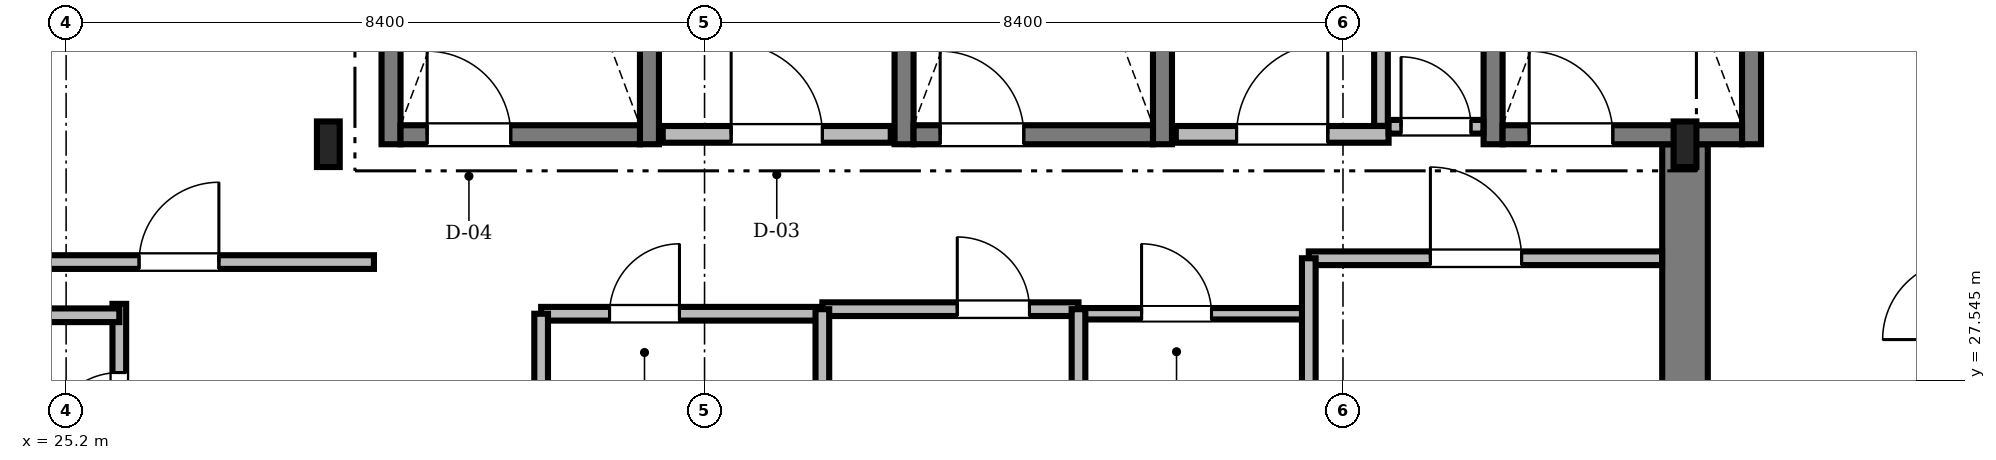
"""IFC4 building model, lengths in metres.
Left out: names, types, materials, properties, quantities, classifications, styles, units other than length and angle.
Written with IfcOpenShell. Run it as: python <this file> out.ifc"""

import sys

from ifc_helpers import new_model, si_unit, direction, frame, frame_2d, origin, origin_2d, place, context, subcontext, project, spatial, rectangle, i_section, extrude, source, transform, mapped, element, fill, save


model = new_model("IFC4")
c1 = context("Model", 3, precision=1e-05, world=origin(), true_north=direction((0.0, 1.0)))
c2 = subcontext(c1, "Body", "Model", "MODEL_VIEW")
j1 = project(units=[si_unit("LENGTHUNIT", "METRE"), si_unit("PLANEANGLEUNIT", "RADIAN")], contexts=[c1])
p1 = place(None, origin())
s1 = spatial("IfcSite", under=j1, at=p1, CompositionType="ELEMENT")
p2 = place(p1, origin())
s2 = spatial("IfcBuilding", under=s1, at=p2, CompositionType="ELEMENT")
p3 = place(p2, frame((0.0, 0.0, 278.25)))
s3 = spatial("IfcBuildingStorey", under=s2, at=p3, CompositionType="ELEMENT", Elevation=278.25)
m1 = source(origin(), c2, "Body", "SweptSolid", [
    extrude(rectangle(XDim=13.15, YDim=0.6, at=frame_2d((6.575, 0.0))), origin(), (0.0, 0.0, 1.0), 3.3),
])
p4 = place(p3, frame((46.5, 17.5, 0.0), z_axis=(0.0, 0.0, 1.0), x_axis=(0.0, 1.0, 0.0)))
e1 = element("IfcWall", 1, at=p4, inside=s3, PredefinedType="SHEAR", context=c2, shape_type="MappedRepresentation", body=[
    mapped(m1, transform((0.0, 0.0, 0.0), scale=1.0)),
])
m2 = source(origin(), c2, "Body", "SweptSolid", [
    extrude(i_section(OverallWidth=0.3, OverallDepth=0.6, WebThickness=0.015, FlangeThickness=0.03, FilletRadius=0.027, at=origin_2d()), origin(), (0.0, 0.0, 1.0), 3.3),
])
for number, where, z_axis, x_axis in (
    (2, (28.65, 30.65, 0.0), (0.0, 0.0, 1.0), (1.0, 0.0, 0.0)),
    (3, (46.5, 30.65, 0.0), (0.0, 0.0, 1.0), (1.0, 0.0, 0.0)),
):
    element("IfcColumn", number, at=place(p3, frame(where, z_axis=z_axis, x_axis=x_axis)), inside=s3, PredefinedType="COLUMN", context=c2, shape_type="MappedRepresentation", body=[
        mapped(m2, transform((0.0, 0.0, 0.0), scale=1.0)),
    ])
m3 = source(origin(), c2, "Body", "SweptSolid", [
    extrude(rectangle(XDim=9.35, YDim=0.25, at=frame_2d((4.675, 0.0))), origin(), (0.0, 0.0, 1.0), 3.75),
])
for number, where, z_axis, x_axis in (
    (4, (29.475, 30.65, 0.0), (0.0, 0.0, 1.0), (0.0, 1.0, 0.0)),
    (5, (32.875, 30.65, 0.0), (0.0, 0.0, 1.0), (0.0, 1.0, 0.0)),
):
    element("IfcWall", number, at=place(p3, frame(where, z_axis=z_axis, x_axis=x_axis)), inside=s3, PredefinedType="SOLIDWALL", context=c2, shape_type="MappedRepresentation", body=[
        mapped(m3, transform((0.0, 0.0, 0.0), scale=1.0)),
    ])
m4 = source(origin(), c2, "Body", "SweptSolid", [
    extrude(rectangle(XDim=3.15, YDim=0.25, at=frame_2d((1.575, 0.0))), origin(), (0.0, 0.0, 1.0), 3.75),
])
p5 = place(p3, frame((29.6, 30.775, 0.0), z_axis=(0.0, 0.0, 1.0), x_axis=(1.0, 0.0, 0.0)))
e6 = element("IfcWall", 6, at=p5, inside=s3, PredefinedType="SOLIDWALL", context=c2, shape_type="MappedRepresentation", body=[
    mapped(m4, transform((0.0, 0.0, 0.0), scale=1.0)),
])
m5 = source(origin(), c2, "Body", "SweptSolid", [
    extrude(rectangle(XDim=1.1, YDim=2.2, at=frame_2d((0.55, 1.1))), frame((0.0, 0.135, 0.0), z_axis=(0.0, -1.0, 0.0), x_axis=(1.0, 0.0, 0.0)), (0.0, 0.0, 1.0), 0.27),
])
p6 = place(p5, frame((0.35, 0.0, 0.0)))
e7 = element("IfcOpeningElement", 7, at=p6, cuts=e6, PredefinedType="OPENING", context=c2, shape_type="MappedRepresentation", body=[
    mapped(m5, transform((0.0, 0.0, 0.0), scale=1.0)),
])
for number, where, z_axis, x_axis in (
    (8, (36.225, 30.65, 0.0), (0.0, 0.0, 1.0), (0.0, 1.0, 0.0)),
    (9, (39.625, 30.65, 0.0), (0.0, 0.0, 1.0), (0.0, 1.0, 0.0)),
):
    element("IfcWall", number, at=place(p3, frame(where, z_axis=z_axis, x_axis=x_axis)), inside=s3, PredefinedType="SOLIDWALL", context=c2, shape_type="MappedRepresentation", body=[
        mapped(m3, transform((0.0, 0.0, 0.0), scale=1.0)),
    ])
p7 = place(p3, frame((36.35, 30.775, 0.0), z_axis=(0.0, 0.0, 1.0), x_axis=(1.0, 0.0, 0.0)))
e10 = element("IfcWall", 10, at=p7, inside=s3, PredefinedType="SOLIDWALL", context=c2, shape_type="MappedRepresentation", body=[
    mapped(m4, transform((0.0, 0.0, 0.0), scale=1.0)),
])
p8 = place(p7, frame((0.35, 0.0, 0.0)))
e11 = element("IfcOpeningElement", 11, at=p8, cuts=e10, PredefinedType="OPENING", context=c2, shape_type="MappedRepresentation", body=[
    mapped(m5, transform((0.0, 0.0, 0.0), scale=1.0)),
])
for number, where, z_axis, x_axis in (
    (12, (43.975, 30.65, 0.0), (0.0, 0.0, 1.0), (0.0, 1.0, 0.0)),
    (13, (47.375, 30.65, 0.0), (0.0, 0.0, 1.0), (0.0, 1.0, 0.0)),
):
    element("IfcWall", number, at=place(p3, frame(where, z_axis=z_axis, x_axis=x_axis)), inside=s3, PredefinedType="SOLIDWALL", context=c2, shape_type="MappedRepresentation", body=[
        mapped(m3, transform((0.0, 0.0, 0.0), scale=1.0)),
    ])
p9 = place(p3, frame((44.1, 30.775, 0.0), z_axis=(0.0, 0.0, 1.0), x_axis=(1.0, 0.0, 0.0)))
e14 = element("IfcWall", 14, at=p9, inside=s3, PredefinedType="SOLIDWALL", context=c2, shape_type="MappedRepresentation", body=[
    mapped(m4, transform((0.0, 0.0, 0.0), scale=1.0)),
])
p10 = place(p9, frame((0.35, 0.0, 0.0)))
e15 = element("IfcOpeningElement", 15, at=p10, cuts=e14, PredefinedType="OPENING", context=c2, shape_type="MappedRepresentation", body=[
    mapped(m5, transform((0.0, 0.0, 0.0), scale=1.0)),
])
m6 = source(origin(), c2, "Body", "SweptSolid", [
    extrude(rectangle(XDim=3.0, YDim=0.22, at=frame_2d((1.5, 0.0))), origin(), (0.0, 0.0, 1.0), 3.3),
])
p11 = place(p3, frame((33.05, 30.78, 0.0), z_axis=(0.0, 0.0, 1.0), x_axis=(1.0, 0.0, 0.0)))
e16 = element("IfcWall", 16, at=p11, inside=s3, PredefinedType="SOLIDWALL", context=c2, shape_type="MappedRepresentation", body=[
    mapped(m6, transform((0.0, 0.0, 0.0), scale=1.0)),
])
m7 = source(origin(), c2, "Body", "SweptSolid", [
    extrude(rectangle(XDim=1.2, YDim=2.2, at=frame_2d((0.6, 1.1))), frame((0.0, 0.12, 0.0), z_axis=(0.0, -1.0, 0.0), x_axis=(1.0, 0.0, 0.0)), (0.0, 0.0, 1.0), 0.24),
])
p12 = place(p11, frame((0.9, 0.0, 0.0)))
e17 = element("IfcOpeningElement", 17, at=p12, cuts=e16, PredefinedType="OPENING", context=c2, shape_type="MappedRepresentation", body=[
    mapped(m7, transform((0.0, 0.0, 0.0), scale=1.0)),
])
m8 = source(origin(), c2, "Body", "SweptSolid", [
    extrude(rectangle(XDim=2.8, YDim=0.22, at=frame_2d((1.4, 0.0))), origin(), (0.0, 0.0, 1.0), 3.3),
])
p13 = place(p3, frame((39.8, 30.78, 0.0), z_axis=(0.0, 0.0, 1.0), x_axis=(1.0, 0.0, 0.0)))
e18 = element("IfcWall", 18, at=p13, inside=s3, PredefinedType="SOLIDWALL", context=c2, shape_type="MappedRepresentation", body=[
    mapped(m8, transform((0.0, 0.0, 0.0), scale=1.0)),
])
p14 = place(p13, frame((0.8, 0.0, 0.0)))
e19 = element("IfcOpeningElement", 19, at=p14, cuts=e18, PredefinedType="OPENING", context=c2, shape_type="MappedRepresentation", body=[
    mapped(m7, transform((0.0, 0.0, 0.0), scale=1.0)),
])
m9 = source(origin(), c2, "Body", "SweptSolid", [
    extrude(rectangle(XDim=14.6, YDim=0.18, at=frame_2d((7.3, 0.0))), origin(), (0.0, 0.0, 1.0), 2.742),
])
p15 = place(p3, frame((25.9, 13.95, 0.0), z_axis=(0.0, 0.0, 1.0), x_axis=(0.0, 1.0, 0.0)))
e20 = element("IfcWall", 20, at=p15, inside=s3, PredefinedType="PARTITIONING", context=c2, shape_type="MappedRepresentation", body=[
    mapped(m9, transform((0.0, 0.0, 0.0), scale=1.0)),
])
m10 = source(origin(), c2, "Body", "SweptSolid", [
    extrude(rectangle(XDim=1.05, YDim=2.2, at=frame_2d((0.525, 1.1))), frame((0.0, 0.1, 0.0), z_axis=(0.0, -1.0, 0.0), x_axis=(1.0, 0.0, 0.0)), (0.0, 0.0, 1.0), 0.2),
])
p16 = place(p15, frame((1.981, 0.0, 0.0)))
e21 = element("IfcOpeningElement", 21, at=p16, cuts=e20, PredefinedType="OPENING", context=c2, shape_type="MappedRepresentation", body=[
    mapped(m10, transform((0.0, 0.0, 0.0), scale=1.0)),
])
m11 = source(origin(), c2, "Body", "SweptSolid", [
    extrude(rectangle(XDim=0.95, YDim=2.15, at=frame_2d((0.475, 1.075))), frame((0.0, 0.1, 0.0), z_axis=(0.0, -1.0, 0.0), x_axis=(1.0, 0.0, 0.0)), (0.0, 0.0, 1.0), 0.2),
])
p17 = place(p15, frame((7.93, 0.0, 0.0)))
e22 = element("IfcOpeningElement", 22, at=p17, cuts=e20, PredefinedType="OPENING", context=c2, shape_type="MappedRepresentation", body=[
    mapped(m11, transform((0.0, 0.0, 0.0), scale=1.0)),
])
p18 = place(p15, frame((12.747, 0.0, 0.0)))
e23 = element("IfcOpeningElement", 23, at=p18, cuts=e20, PredefinedType="OPENING", context=c2, shape_type="MappedRepresentation", body=[
    mapped(m11, transform((0.0, 0.0, 0.0), scale=1.0)),
])
m12 = source(origin(), c2, "Body", "SweptSolid", [
    extrude(rectangle(XDim=10.088, YDim=0.18, at=frame_2d((5.044, 0.0))), origin(), (0.0, 0.0, 1.0), 2.08),
])
p19 = place(p3, frame((19.162, 29.1, 0.0), z_axis=(0.0, 0.0, 1.0), x_axis=(1.0, 0.0, 0.0)))
e24 = element("IfcWall", 24, at=p19, inside=s3, PredefinedType="PARTITIONING", context=c2, shape_type="MappedRepresentation", body=[
    mapped(m12, transform((0.0, 0.0, 0.0), scale=1.0)),
])
p20 = place(p19, frame((6.998, 0.0, 0.0)))
e25 = element("IfcOpeningElement", 25, at=p20, cuts=e24, PredefinedType="OPENING", context=c2, shape_type="MappedRepresentation", body=[
    mapped(m10, transform((0.0, 0.0, 0.0), scale=1.0)),
])
m13 = source(origin(), c2, "Body", "SweptSolid", [
    extrude(rectangle(XDim=4.648, YDim=0.18, at=frame_2d((2.324, 0.0))), origin(), (0.0, 0.0, 1.0), 2.932),
])
p21 = place(p3, frame((41.55, 29.15, 0.0), z_axis=(0.0, 0.0, 1.0), x_axis=(1.0, 0.0, 0.0)))
e26 = element("IfcWall", 26, at=p21, inside=s3, PredefinedType="PARTITIONING", context=c2, shape_type="MappedRepresentation", body=[
    mapped(m13, transform((0.0, 0.0, 0.0), scale=1.0)),
])
m14 = source(origin(), c2, "Body", "SweptSolid", [
    extrude(rectangle(XDim=1.2, YDim=2.2, at=frame_2d((0.6, 1.1))), frame((0.0, 0.1, 0.0), z_axis=(0.0, -1.0, 0.0), x_axis=(1.0, 0.0, 0.0)), (0.0, 0.0, 1.0), 0.2),
])
p22 = place(p21, frame((1.6, 0.0, 0.0)))
e27 = element("IfcOpeningElement", 27, at=p22, cuts=e26, PredefinedType="OPENING", context=c2, shape_type="MappedRepresentation", body=[
    mapped(m14, transform((0.0, 0.0, 0.0), scale=1.0)),
])
m15 = source(origin(), c2, "Body", "SweptSolid", [
    extrude(rectangle(XDim=3.7, YDim=0.18, at=frame_2d((1.85, 0.0))), origin(), (0.0, 0.0, 1.0), 2.932),
])
p23 = place(p3, frame((31.45, 28.42, 0.0), z_axis=(0.0, 0.0, 1.0), x_axis=(1.0, 0.0, 0.0)))
e28 = element("IfcWall", 28, at=p23, inside=s3, PredefinedType="PARTITIONING", context=c2, shape_type="MappedRepresentation", body=[
    mapped(m15, transform((0.0, 0.0, 0.0), scale=1.0)),
])
m16 = source(origin(), c2, "Body", "SweptSolid", [
    extrude(rectangle(XDim=0.92, YDim=2.1, at=frame_2d((0.46, 1.05))), frame((0.0, 0.1, 0.0), z_axis=(0.0, -1.0, 0.0), x_axis=(1.0, 0.0, 0.0)), (0.0, 0.0, 1.0), 0.2),
])
p24 = place(p23, frame((0.9, 0.0, 0.0)))
e29 = element("IfcOpeningElement", 29, at=p24, cuts=e28, PredefinedType="OPENING", context=c2, shape_type="MappedRepresentation", body=[
    mapped(m16, transform((0.0, 0.0, 0.0), scale=1.0)),
])
m17 = source(origin(), c2, "Body", "SweptSolid", [
    extrude(rectangle(XDim=3.37, YDim=0.18, at=frame_2d((1.685, 0.0))), origin(), (0.0, 0.0, 1.0), 3.3),
])
p25 = place(p3, frame((35.15, 28.48, 0.0), z_axis=(0.0, 0.0, 1.0), x_axis=(1.0, 0.0, 0.0)))
e30 = element("IfcWall", 30, at=p25, inside=s3, PredefinedType="PARTITIONING", context=c2, shape_type="MappedRepresentation", body=[
    mapped(m17, transform((0.0, 0.0, 0.0), scale=1.0)),
])
p26 = place(p25, frame((1.775, 0.0, 0.0)))
e31 = element("IfcOpeningElement", 31, at=p26, cuts=e30, PredefinedType="OPENING", context=c2, shape_type="MappedRepresentation", body=[
    mapped(m11, transform((0.0, 0.0, 0.0), scale=1.0)),
])
m18 = source(origin(), c2, "Body", "SweptSolid", [
    extrude(rectangle(XDim=3.0, YDim=0.15, at=frame_2d((1.5, 0.0))), origin(), (0.0, 0.0, 1.0), 3.3),
])
p27 = place(p3, frame((38.52, 28.42, 0.0), z_axis=(0.0, 0.0, 1.0), x_axis=(1.0, 0.0, 0.0)))
e32 = element("IfcWall", 32, at=p27, inside=s3, PredefinedType="PARTITIONING", context=c2, shape_type="MappedRepresentation", body=[
    mapped(m18, transform((0.0, 0.0, 0.0), scale=1.0)),
])
m19 = source(origin(), c2, "Body", "SweptSolid", [
    extrude(rectangle(XDim=0.92, YDim=2.1, at=frame_2d((0.46, 1.05))), frame((0.0, 0.085, 0.0), z_axis=(0.0, -1.0, 0.0), x_axis=(1.0, 0.0, 0.0)), (0.0, 0.0, 1.0), 0.17),
])
p28 = place(p27, frame((0.83, 0.0, 0.0)))
e33 = element("IfcOpeningElement", 33, at=p28, cuts=e32, PredefinedType="OPENING", context=c2, shape_type="MappedRepresentation", body=[
    mapped(m19, transform((0.0, 0.0, 0.0), scale=1.0)),
])
m20 = source(origin(), c2, "Body", "SweptSolid", [
    extrude(rectangle(XDim=1.248, YDim=0.18, at=frame_2d((0.624, 0.0))), origin(), (0.0, 0.0, 1.0), 3.3),
])
p29 = place(p3, frame((42.6, 30.88, 0.0), z_axis=(0.0, 0.0, 1.0), x_axis=(1.0, 0.0, 0.0)))
e34 = element("IfcWall", 34, at=p29, inside=s3, PredefinedType="PARTITIONING", context=c2, shape_type="MappedRepresentation", body=[
    mapped(m20, transform((0.0, 0.0, 0.0), scale=1.0)),
])
p30 = place(p29, frame((0.164, 0.0, 0.0)))
e35 = element("IfcOpeningElement", 35, at=p30, cuts=e34, PredefinedType="OPENING", context=c2, shape_type="MappedRepresentation", body=[
    mapped(m16, transform((0.0, 0.0, 0.0), scale=1.0)),
])
m21 = source(origin(), c2, "Body", "SweptSolid", [
    extrude(rectangle(XDim=6.93, YDim=0.18, at=frame_2d((3.465, 0.0))), origin(), (0.0, 0.0, 1.0), 2.08),
])
p31 = place(p3, frame((18.97, 28.4, 0.0), z_axis=(0.0, 0.0, 1.0), x_axis=(1.0, 0.0, 0.0)))
e36 = element("IfcWall", 36, at=p31, inside=s3, PredefinedType="PARTITIONING", context=c2, shape_type="MappedRepresentation", body=[
    mapped(m21, transform((0.0, 0.0, 0.0), scale=1.0)),
])
m22 = source(origin(), c2, "Body", "SweptSolid", [
    extrude(rectangle(XDim=2.35, YDim=0.18, at=frame_2d((1.175, 0.0))), origin(), (0.0, 0.0, 1.0), 2.932),
])
p32 = place(p3, frame((41.55, 26.8, 0.0), z_axis=(0.0, 0.0, 1.0), x_axis=(0.0, 1.0, 0.0)))
e37 = element("IfcWall", 37, at=p32, inside=s3, PredefinedType="PARTITIONING", context=c2, shape_type="MappedRepresentation", body=[
    mapped(m22, transform((0.0, 0.0, 0.0), scale=1.0)),
])
m23 = source(origin(), c2, "Body", "SweptSolid", [
    extrude(rectangle(XDim=1.858, YDim=0.18, at=frame_2d((0.929, 0.0))), origin(), (0.0, 0.0, 1.0), 3.3),
])
p33 = place(p3, frame((42.5, 30.892, 0.0), z_axis=(0.0, 0.0, 1.0), x_axis=(0.0, 1.0, 0.0)))
e38 = element("IfcWall", 38, at=p33, inside=s3, PredefinedType="PARTITIONING", context=c2, shape_type="MappedRepresentation", body=[
    mapped(m23, transform((0.0, 0.0, 0.0), scale=1.0)),
])
m24 = source(origin(), c2, "Body", "SweptSolid", [
    extrude(rectangle(XDim=1.66, YDim=0.18, at=frame_2d((0.83, 0.0))), origin(), (0.0, 0.0, 1.0), 2.842),
])
for number, where, z_axis, x_axis in (
    (39, (35.15, 26.82, 0.0), (0.0, 0.0, 1.0), (0.0, 1.0, 0.0)),
    (40, (38.52, 26.82, 0.0), (0.0, 0.0, 1.0), (0.0, 1.0, 0.0)),
):
    element("IfcWall", number, at=place(p3, frame(where, z_axis=z_axis, x_axis=x_axis)), inside=s3, PredefinedType="PARTITIONING", context=c2, shape_type="MappedRepresentation", body=[
        mapped(m24, transform((0.0, 0.0, 0.0), scale=1.0)),
    ])
m25 = source(origin(), c2, "Body", "SweptSolid", [
    extrude(rectangle(XDim=1.6, YDim=0.18, at=frame_2d((0.8, 0.0))), origin(), (0.0, 0.0, 1.0), 2.842),
])
p34 = place(p3, frame((31.45, 26.82, 0.0), z_axis=(0.0, 0.0, 1.0), x_axis=(0.0, 1.0, 0.0)))
e41 = element("IfcWall", 41, at=p34, inside=s3, PredefinedType="PARTITIONING", context=c2, shape_type="MappedRepresentation", body=[
    mapped(m25, transform((0.0, 0.0, 0.0), scale=1.0)),
])
m26 = source(origin(), c2, "Body", "SweptSolid", [
    extrude(rectangle(XDim=1.1, YDim=2.2, at=frame_2d((0.55, 1.1))), frame((0.0, 0.025, 0.0), z_axis=(0.0, -1.0, 0.0), x_axis=(1.0, 0.0, 0.0)), (0.0, 0.0, 1.0), 0.05),
])
p35 = place(p6, origin())
e42 = element("IfcDoor", 42, at=p35, inside=s3, OperationType="SINGLE_SWING_LEFT", PredefinedType="DOOR", context=c2, shape_type="MappedRepresentation", body=[
    mapped(m26, transform((0.0, 0.0, 0.0), scale=1.0)),
])
fill(e7, e42)
p36 = place(p8, origin())
e43 = element("IfcDoor", 43, at=p36, inside=s3, OperationType="SINGLE_SWING_LEFT", PredefinedType="DOOR", context=c2, shape_type="MappedRepresentation", body=[
    mapped(m26, transform((0.0, 0.0, 0.0), scale=1.0)),
])
fill(e11, e43)
p37 = place(p10, origin())
e44 = element("IfcDoor", 44, at=p37, inside=s3, OperationType="SINGLE_SWING_LEFT", PredefinedType="DOOR", context=c2, shape_type="MappedRepresentation", body=[
    mapped(m26, transform((0.0, 0.0, 0.0), scale=1.0)),
])
fill(e15, e44)
m27 = source(origin(), c2, "Body", "SweptSolid", [
    extrude(rectangle(XDim=1.2, YDim=2.2, at=frame_2d((0.6, 1.1))), frame((0.0, 0.025, 0.0), z_axis=(0.0, -1.0, 0.0), x_axis=(1.0, 0.0, 0.0)), (0.0, 0.0, 1.0), 0.05),
])
p38 = place(p12, origin())
e45 = element("IfcDoor", 45, at=p38, inside=s3, OperationType="SINGLE_SWING_LEFT", PredefinedType="DOOR", context=c2, shape_type="MappedRepresentation", body=[
    mapped(m27, transform((0.0, 0.0, 0.0), scale=1.0)),
])
fill(e17, e45)
p39 = place(p14, origin())
e46 = element("IfcDoor", 46, at=p39, inside=s3, OperationType="SINGLE_SWING_RIGHT", PredefinedType="DOOR", context=c2, shape_type="MappedRepresentation", body=[
    mapped(m27, transform((0.0, 0.0, 0.0), scale=1.0)),
])
fill(e19, e46)
m28 = source(origin(), c2, "Body", "SweptSolid", [
    extrude(rectangle(XDim=0.95, YDim=2.15, at=frame_2d((0.475, 1.075))), frame((0.0, 0.025, 0.0), z_axis=(0.0, -1.0, 0.0), x_axis=(1.0, 0.0, 0.0)), (0.0, 0.0, 1.0), 0.05),
])
p40 = place(p18, origin())
e47 = element("IfcDoor", 47, at=p40, inside=s3, OperationType="SINGLE_SWING_LEFT", PredefinedType="DOOR", context=c2, shape_type="MappedRepresentation", body=[
    mapped(m28, transform((0.0, 0.0, 0.0), scale=1.0)),
])
fill(e23, e47)
m29 = source(origin(), c2, "Body", "SweptSolid", [
    extrude(rectangle(XDim=1.05, YDim=2.2, at=frame_2d((0.525, 1.1))), frame((0.0, 0.025, 0.0), z_axis=(0.0, -1.0, 0.0), x_axis=(1.0, 0.0, 0.0)), (0.0, 0.0, 1.0), 0.05),
])
p41 = place(p20, origin())
e48 = element("IfcDoor", 48, at=p41, inside=s3, OperationType="SINGLE_SWING_RIGHT", PredefinedType="DOOR", context=c2, shape_type="MappedRepresentation", body=[
    mapped(m29, transform((0.0, 0.0, 0.0), scale=1.0)),
])
fill(e25, e48)
p42 = place(p22, origin())
e49 = element("IfcDoor", 49, at=p42, inside=s3, OperationType="SINGLE_SWING_LEFT", PredefinedType="DOOR", context=c2, shape_type="MappedRepresentation", body=[
    mapped(m27, transform((0.0, 0.0, 0.0), scale=1.0)),
])
fill(e27, e49)
m30 = source(origin(), c2, "Body", "SweptSolid", [
    extrude(rectangle(XDim=0.92, YDim=2.1, at=frame_2d((0.46, 1.05))), frame((0.0, 0.025, 0.0), z_axis=(0.0, -1.0, 0.0), x_axis=(1.0, 0.0, 0.0)), (0.0, 0.0, 1.0), 0.05),
])
p43 = place(p24, origin())
e50 = element("IfcDoor", 50, at=p43, inside=s3, OperationType="SINGLE_SWING_RIGHT", PredefinedType="DOOR", context=c2, shape_type="MappedRepresentation", body=[
    mapped(m30, transform((0.0, 0.0, 0.0), scale=1.0)),
])
fill(e29, e50)
p44 = place(p26, origin())
e51 = element("IfcDoor", 51, at=p44, inside=s3, OperationType="SINGLE_SWING_LEFT", PredefinedType="DOOR", context=c2, shape_type="MappedRepresentation", body=[
    mapped(m28, transform((0.0, 0.0, 0.0), scale=1.0)),
])
fill(e31, e51)
p45 = place(p28, origin())
e52 = element("IfcDoor", 52, at=p45, inside=s3, OperationType="SINGLE_SWING_LEFT", PredefinedType="DOOR", context=c2, shape_type="MappedRepresentation", body=[
    mapped(m30, transform((0.0, 0.0, 0.0), scale=1.0)),
])
fill(e33, e52)
p46 = place(p30, origin())
e53 = element("IfcDoor", 53, at=p46, inside=s3, OperationType="SINGLE_SWING_LEFT", PredefinedType="DOOR", context=c2, shape_type="MappedRepresentation", body=[
    mapped(m30, transform((0.0, 0.0, 0.0), scale=1.0)),
])
fill(e35, e53)
save(model, sys.argv[1])
